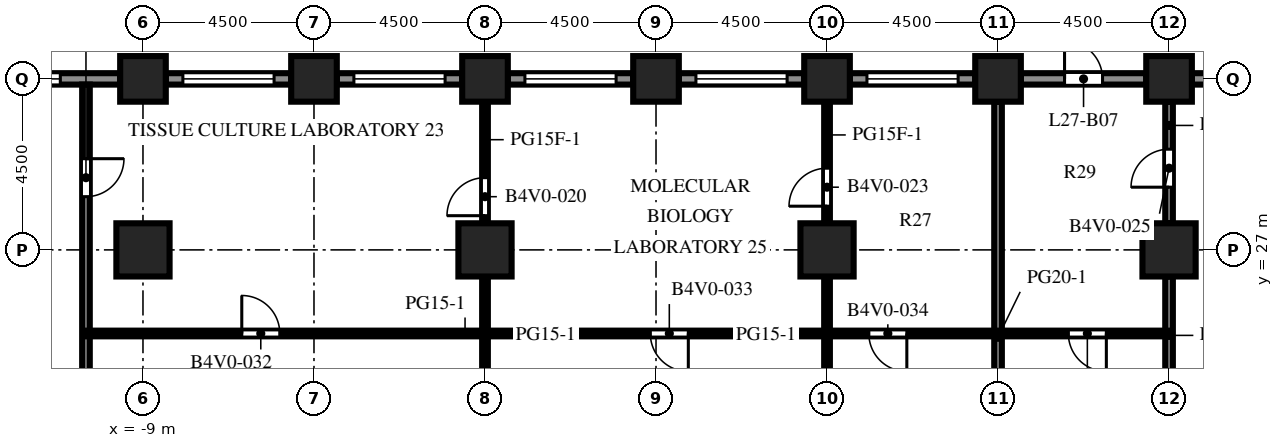
"""IFC4 building model, lengths in metres.
Left out: names, types, materials, properties, quantities, classifications, styles, units other than length and angle.
Written with IfcOpenShell. Run it as: python <this file> out.ifc"""

import sys

from ifc_helpers import new_model, si_unit, direction, frame, frame_2d, origin, origin_2d, place, context, subcontext, project, spatial, rectangle, extrude, element, fill, save


model = new_model("IFC4")
c1 = context("Model", 3, precision=1e-05, world=origin(), true_north=direction((0.0, 1.0)))
c2 = subcontext(c1, "Body", "Model", "MODEL_VIEW")
j1 = project(units=[si_unit("LENGTHUNIT", "METRE"), si_unit("PLANEANGLEUNIT", "RADIAN")], contexts=[c1])
p1 = place(None, origin())
s1 = spatial("IfcSite", under=j1, at=p1, CompositionType="ELEMENT")
p2 = place(p1, origin())
s2 = spatial("IfcBuilding", under=s1, at=p2, CompositionType="ELEMENT")
p3 = place(p2, frame((0.0, 0.0, 120.8)))
s3 = spatial("IfcBuildingStorey", under=s2, at=p3, CompositionType="ELEMENT", Elevation=120.8)
for number, where, z_axis, x_axis in (
    (1, (-9.0, 31.5, 0.0), (0.0, 0.0, 1.0), (1.0, 0.0, 0.0)),
    (2, (-4.5, 31.5, 0.0), (0.0, 0.0, 1.0), (1.0, 0.0, 0.0)),
    (3, (0.0, 31.5, 0.0), (0.0, 0.0, 1.0), (1.0, 0.0, 0.0)),
    (4, (4.5, 31.5, 0.0), (0.0, 0.0, 1.0), (1.0, 0.0, 0.0)),
    (5, (9.0, 31.5, 0.0), (0.0, 0.0, 1.0), (1.0, 0.0, 0.0)),
    (6, (13.5, 31.5, 0.0), (0.0, 0.0, 1.0), (1.0, 0.0, 0.0)),
    (7, (18.0, 31.5, 0.0), (0.0, 0.0, 1.0), (1.0, 0.0, 0.0)),
):
    element("IfcColumn", number, at=place(p3, frame(where, z_axis=z_axis, x_axis=x_axis)), inside=s3, PredefinedType="COLUMN", context=c2, shape_type="SweptSolid", body=[
        extrude(rectangle(XDim=1.2, YDim=1.2, at=origin_2d()), origin(), (0.0, 0.0, 1.0), 4.1),
    ])
for number, where, z_axis, x_axis in (
    (8, (-9.0, 27.0, 0.0), (0.0, 0.0, 1.0), (1.0, 0.0, 0.0)),
    (9, (0.0, 27.0, 0.0), (0.0, 0.0, 1.0), (1.0, 0.0, 0.0)),
    (10, (9.0, 27.0, 0.0), (0.0, 0.0, 1.0), (1.0, 0.0, 0.0)),
    (11, (18.0, 27.0, 0.0), (0.0, 0.0, 1.0), (1.0, 0.0, 0.0)),
):
    element("IfcColumn", number, at=place(p3, frame(where, z_axis=z_axis, x_axis=x_axis)), inside=s3, PredefinedType="COLUMN", context=c2, shape_type="SweptSolid", body=[
        extrude(rectangle(XDim=1.4, YDim=1.4, at=origin_2d()), origin(), (0.0, 0.0, 1.0), 4.1),
    ])
p4 = place(p3, frame((18.6, 31.5, 0.0), z_axis=(0.0, 0.0, 1.0), x_axis=(1.0, 0.0, 0.0)))
e12 = element("IfcWall", 12, at=p4, inside=s3, PredefinedType="SOLIDWALL", context=c2, shape_type="SweptSolid", body=[
    extrude(rectangle(XDim=3.3, YDim=0.3, at=frame_2d((1.65, 0.0))), origin(), (0.0, 0.0, 1.0), 2.75),
])
p5 = place(p4, frame((0.525, 0.0, 0.8)))
e13 = element("IfcOpeningElement", 13, at=p5, cuts=e12, PredefinedType="OPENING", context=c2, shape_type="SweptSolid", body=[
    extrude(rectangle(XDim=1.2, YDim=1.7, at=frame_2d((0.6, 0.85))), frame((0.0, 0.16, 0.0), z_axis=(0.0, -1.0, 0.0), x_axis=(1.0, 0.0, 0.0)), (0.0, 0.0, 1.0), 0.32),
])
p6 = place(p3, frame((14.1, 31.5, 0.0), z_axis=(0.0, 0.0, 1.0), x_axis=(1.0, 0.0, 0.0)))
e14 = element("IfcWall", 14, at=p6, inside=s3, PredefinedType="SOLIDWALL", context=c2, shape_type="SweptSolid", body=[
    extrude(rectangle(XDim=3.3, YDim=0.3, at=frame_2d((1.65, 0.0))), origin(), (0.0, 0.0, 1.0), 2.75),
])
p7 = place(p6, frame((1.15, 0.0, 0.0)))
e15 = element("IfcOpeningElement", 15, at=p7, cuts=e14, PredefinedType="OPENING", context=c2, shape_type="SweptSolid", body=[
    extrude(rectangle(XDim=1.0, YDim=2.2, at=frame_2d((0.5, 1.1))), frame((0.0, 0.16, 0.0), z_axis=(0.0, -1.0, 0.0), x_axis=(1.0, 0.0, 0.0)), (0.0, 0.0, 1.0), 0.32),
])
p8 = place(p3, frame((9.6, 31.5, 0.0), z_axis=(0.0, 0.0, 1.0), x_axis=(1.0, 0.0, 0.0)))
e16 = element("IfcWall", 16, at=p8, inside=s3, PredefinedType="SOLIDWALL", context=c2, shape_type="SweptSolid", body=[
    extrude(rectangle(XDim=3.3, YDim=0.3, at=frame_2d((1.65, 0.0))), origin(), (0.0, 0.0, 1.0), 2.75),
])
p9 = place(p8, frame((0.45, 0.0, 0.8)))
e17 = element("IfcOpeningElement", 17, at=p9, cuts=e16, PredefinedType="OPENING", context=c2, shape_type="SweptSolid", body=[
    extrude(rectangle(XDim=2.4, YDim=1.7, at=frame_2d((1.2, 0.85))), frame((0.0, 0.16, 0.0), z_axis=(0.0, -1.0, 0.0), x_axis=(1.0, 0.0, 0.0)), (0.0, 0.0, 1.0), 0.32),
])
p10 = place(p3, frame((5.1, 31.5, 0.0), z_axis=(0.0, 0.0, 1.0), x_axis=(1.0, 0.0, 0.0)))
e18 = element("IfcWall", 18, at=p10, inside=s3, PredefinedType="SOLIDWALL", context=c2, shape_type="SweptSolid", body=[
    extrude(rectangle(XDim=3.3, YDim=0.3, at=frame_2d((1.65, 0.0))), origin(), (0.0, 0.0, 1.0), 2.75),
])
p11 = place(p10, frame((0.45, 0.0, 0.8)))
e19 = element("IfcOpeningElement", 19, at=p11, cuts=e18, PredefinedType="OPENING", context=c2, shape_type="SweptSolid", body=[
    extrude(rectangle(XDim=2.4, YDim=1.7, at=frame_2d((1.2, 0.85))), frame((0.0, 0.16, 0.0), z_axis=(0.0, -1.0, 0.0), x_axis=(1.0, 0.0, 0.0)), (0.0, 0.0, 1.0), 0.32),
])
p12 = place(p3, frame((0.6, 31.5, 0.0), z_axis=(0.0, 0.0, 1.0), x_axis=(1.0, 0.0, 0.0)))
e20 = element("IfcWall", 20, at=p12, inside=s3, PredefinedType="SOLIDWALL", context=c2, shape_type="SweptSolid", body=[
    extrude(rectangle(XDim=3.3, YDim=0.3, at=frame_2d((1.65, 0.0))), origin(), (0.0, 0.0, 1.0), 2.75),
])
p13 = place(p12, frame((0.45, 0.0, 0.8)))
e21 = element("IfcOpeningElement", 21, at=p13, cuts=e20, PredefinedType="OPENING", context=c2, shape_type="SweptSolid", body=[
    extrude(rectangle(XDim=2.4, YDim=1.7, at=frame_2d((1.2, 0.85))), frame((0.0, 0.16, 0.0), z_axis=(0.0, -1.0, 0.0), x_axis=(1.0, 0.0, 0.0)), (0.0, 0.0, 1.0), 0.32),
])
p14 = place(p3, frame((-3.9, 31.5, 0.0), z_axis=(0.0, 0.0, 1.0), x_axis=(1.0, 0.0, 0.0)))
e22 = element("IfcWall", 22, at=p14, inside=s3, PredefinedType="SOLIDWALL", context=c2, shape_type="SweptSolid", body=[
    extrude(rectangle(XDim=3.3, YDim=0.3, at=frame_2d((1.65, 0.0))), origin(), (0.0, 0.0, 1.0), 2.75),
])
p15 = place(p14, frame((0.45, 0.0, 0.8)))
e23 = element("IfcOpeningElement", 23, at=p15, cuts=e22, PredefinedType="OPENING", context=c2, shape_type="SweptSolid", body=[
    extrude(rectangle(XDim=2.4, YDim=1.7, at=frame_2d((1.2, 0.85))), frame((0.0, 0.16, 0.0), z_axis=(0.0, -1.0, 0.0), x_axis=(1.0, 0.0, 0.0)), (0.0, 0.0, 1.0), 0.32),
])
p16 = place(p3, frame((-8.4, 31.5, 0.0), z_axis=(0.0, 0.0, 1.0), x_axis=(1.0, 0.0, 0.0)))
e24 = element("IfcWall", 24, at=p16, inside=s3, PredefinedType="SOLIDWALL", context=c2, shape_type="SweptSolid", body=[
    extrude(rectangle(XDim=3.3, YDim=0.3, at=frame_2d((1.65, 0.0))), origin(), (0.0, 0.0, 1.0), 2.75),
])
p17 = place(p16, frame((0.45, 0.0, 0.8)))
e25 = element("IfcOpeningElement", 25, at=p17, cuts=e24, PredefinedType="OPENING", context=c2, shape_type="SweptSolid", body=[
    extrude(rectangle(XDim=2.4, YDim=1.7, at=frame_2d((1.2, 0.85))), frame((0.0, 0.16, 0.0), z_axis=(0.0, -1.0, 0.0), x_axis=(1.0, 0.0, 0.0)), (0.0, 0.0, 1.0), 0.32),
])
p18 = place(p3, frame((-12.9, 31.5, 0.0), z_axis=(0.0, 0.0, 1.0), x_axis=(1.0, 0.0, 0.0)))
e26 = element("IfcWall", 26, at=p18, inside=s3, PredefinedType="SOLIDWALL", context=c2, shape_type="SweptSolid", body=[
    extrude(rectangle(XDim=3.3, YDim=0.3, at=frame_2d((1.65, 0.0))), origin(), (0.0, 0.0, 1.0), 2.75),
])
p19 = place(p18, frame((0.525, 0.0, 0.8)))
e27 = element("IfcOpeningElement", 27, at=p19, cuts=e26, PredefinedType="OPENING", context=c2, shape_type="SweptSolid", body=[
    extrude(rectangle(XDim=1.2, YDim=1.7, at=frame_2d((0.6, 0.85))), frame((0.0, 0.16, 0.0), z_axis=(0.0, -1.0, 0.0), x_axis=(1.0, 0.0, 0.0)), (0.0, 0.0, 1.0), 0.32),
])
p20 = place(p3, frame((-10.5, 31.35, 0.0), z_axis=(0.0, 0.0, 1.0), x_axis=(0.0, -1.0, 0.0)))
e28 = element("IfcWall", 28, at=p20, inside=s3, PredefinedType="PARTITIONING", context=c2, shape_type="SweptSolid", body=[
    extrude(rectangle(XDim=12.85, YDim=0.2, at=frame_2d((6.425, 0.0))), origin(), (0.0, 0.0, 1.0), 3.65),
])
p21 = place(p20, frame((1.95, 0.0, 0.0)))
e29 = element("IfcOpeningElement", 29, at=p21, cuts=e28, PredefinedType="OPENING", context=c2, shape_type="SweptSolid", body=[
    extrude(rectangle(XDim=1.0, YDim=2.1, at=frame_2d((0.5, 1.05))), frame((0.0, 0.11, 0.0), z_axis=(0.0, -1.0, 0.0), x_axis=(1.0, 0.0, 0.0)), (0.0, 0.0, 1.0), 0.22),
])
p22 = place(p3, frame((0.0, 23.2, 0.0), z_axis=(0.0, 0.0, 1.0), x_axis=(0.0, 1.0, 0.0)))
e30 = element("IfcWall", 30, at=p22, inside=s3, PredefinedType="PARTITIONING", context=c2, shape_type="SweptSolid", body=[
    extrude(rectangle(XDim=3.1, YDim=0.15, at=frame_2d((1.55, 0.0))), origin(), (0.0, 0.0, 1.0), 3.65),
])
p23 = place(p3, frame((0.0, 30.9, 0.0), z_axis=(0.0, 0.0, 1.0), x_axis=(0.0, -1.0, 0.0)))
e31 = element("IfcWall", 31, at=p23, inside=s3, PredefinedType="PARTITIONING", context=c2, shape_type="SweptSolid", body=[
    extrude(rectangle(XDim=3.2, YDim=0.15, at=frame_2d((1.6, 0.0))), origin(), (0.0, 0.0, 1.0), 3.65),
])
p24 = place(p23, frame((2.0, 0.0, 0.0)))
e32 = element("IfcOpeningElement", 32, at=p24, cuts=e31, PredefinedType="OPENING", context=c2, shape_type="SweptSolid", body=[
    extrude(rectangle(XDim=1.0, YDim=2.1, at=frame_2d((0.5, 1.05))), frame((0.0, 0.085, 0.0), z_axis=(0.0, -1.0, 0.0), x_axis=(1.0, 0.0, 0.0)), (0.0, 0.0, 1.0), 0.17),
])
p25 = place(p3, frame((9.0, 23.2, 0.0), z_axis=(0.0, 0.0, 1.0), x_axis=(0.0, 1.0, 0.0)))
e33 = element("IfcWall", 33, at=p25, inside=s3, PredefinedType="PARTITIONING", context=c2, shape_type="SweptSolid", body=[
    extrude(rectangle(XDim=3.1, YDim=0.15, at=frame_2d((1.55, 0.0))), origin(), (0.0, 0.0, 1.0), 3.65),
])
p26 = place(p3, frame((9.0, 30.9, 0.0), z_axis=(0.0, 0.0, 1.0), x_axis=(0.0, -1.0, 0.0)))
e34 = element("IfcWall", 34, at=p26, inside=s3, PredefinedType="PARTITIONING", context=c2, shape_type="SweptSolid", body=[
    extrude(rectangle(XDim=3.2, YDim=0.15, at=frame_2d((1.6, 0.0))), origin(), (0.0, 0.0, 1.0), 3.65),
])
p27 = place(p26, frame((1.75, 0.0, 0.0)))
e35 = element("IfcOpeningElement", 35, at=p27, cuts=e34, PredefinedType="OPENING", context=c2, shape_type="SweptSolid", body=[
    extrude(rectangle(XDim=1.0, YDim=2.1, at=frame_2d((0.5, 1.05))), frame((0.0, 0.085, 0.0), z_axis=(0.0, -1.0, 0.0), x_axis=(1.0, 0.0, 0.0)), (0.0, 0.0, 1.0), 0.17),
])
p28 = place(p3, frame((13.5, 18.5, 0.0), z_axis=(0.0, 0.0, 1.0), x_axis=(0.0, 1.0, 0.0)))
e36 = element("IfcWall", 36, at=p28, inside=s3, PredefinedType="PARTITIONING", context=c2, shape_type="SweptSolid", body=[
    extrude(rectangle(XDim=12.4, YDim=0.2, at=frame_2d((6.2, 0.0))), origin(), (0.0, 0.0, 1.0), 3.65),
])
p29 = place(p3, frame((18.0, 23.2, 0.0), z_axis=(0.0, 0.0, 1.0), x_axis=(0.0, 1.0, 0.0)))
e37 = element("IfcWall", 37, at=p29, inside=s3, PredefinedType="PARTITIONING", context=c2, shape_type="SweptSolid", body=[
    extrude(rectangle(XDim=3.1, YDim=0.2, at=frame_2d((1.55, 0.0))), origin(), (0.0, 0.0, 1.0), 3.65),
])
p30 = place(p3, frame((18.0, 27.7, 0.0), z_axis=(0.0, 0.0, 1.0), x_axis=(0.0, 1.0, 0.0)))
e38 = element("IfcWall", 38, at=p30, inside=s3, PredefinedType="PARTITIONING", context=c2, shape_type="SweptSolid", body=[
    extrude(rectangle(XDim=3.2, YDim=0.2, at=frame_2d((1.6, 0.0))), origin(), (0.0, 0.0, 1.0), 3.65),
])
p31 = place(p30, frame((0.95, 0.0, 0.0)))
e39 = element("IfcOpeningElement", 39, at=p31, cuts=e38, PredefinedType="OPENING", context=c2, shape_type="SweptSolid", body=[
    extrude(rectangle(XDim=1.0, YDim=2.1, at=frame_2d((0.5, 1.05))), frame((0.0, 0.11, 0.0), z_axis=(0.0, -1.0, 0.0), x_axis=(1.0, 0.0, 0.0)), (0.0, 0.0, 1.0), 0.22),
])
p32 = place(p3, frame((18.0, 24.8, 0.0), z_axis=(0.0, 0.0, 1.0), x_axis=(-1.0, 0.0, 0.0)))
e40 = element("IfcWall", 40, at=p32, inside=s3, PredefinedType="PARTITIONING", context=c2, shape_type="SweptSolid", body=[
    extrude(rectangle(XDim=28.5, YDim=0.15, at=frame_2d((14.25, 0.0))), origin(), (0.0, 0.0, 1.0), 3.65),
])
p33 = place(p32, frame((23.4, 0.0, 0.0)))
e41 = element("IfcOpeningElement", 41, at=p33, cuts=e40, PredefinedType="OPENING", context=c2, shape_type="SweptSolid", body=[
    extrude(rectangle(XDim=1.0, YDim=2.1, at=frame_2d((0.5, 1.05))), frame((0.0, 0.085, 0.0), z_axis=(0.0, -1.0, 0.0), x_axis=(1.0, 0.0, 0.0)), (0.0, 0.0, 1.0), 0.17),
])
p34 = place(p32, frame((12.65, 0.0, 0.0)))
e42 = element("IfcOpeningElement", 42, at=p34, cuts=e40, PredefinedType="OPENING", context=c2, shape_type="SweptSolid", body=[
    extrude(rectangle(XDim=1.0, YDim=2.1, at=frame_2d((0.5, 1.05))), frame((0.0, 0.085, 0.0), z_axis=(0.0, -1.0, 0.0), x_axis=(1.0, 0.0, 0.0)), (0.0, 0.0, 1.0), 0.17),
])
p35 = place(p32, frame((6.9, 0.0, 0.0)))
e43 = element("IfcOpeningElement", 43, at=p35, cuts=e40, PredefinedType="OPENING", context=c2, shape_type="SweptSolid", body=[
    extrude(rectangle(XDim=1.0, YDim=2.1, at=frame_2d((0.5, 1.05))), frame((0.0, 0.085, 0.0), z_axis=(0.0, -1.0, 0.0), x_axis=(1.0, 0.0, 0.0)), (0.0, 0.0, 1.0), 0.17),
])
p36 = place(p32, frame((1.65, 0.0, 0.0)))
e44 = element("IfcOpeningElement", 44, at=p36, cuts=e40, PredefinedType="OPENING", context=c2, shape_type="SweptSolid", body=[
    extrude(rectangle(XDim=1.0, YDim=2.1, at=frame_2d((0.5, 1.05))), frame((0.0, 0.085, 0.0), z_axis=(0.0, -1.0, 0.0), x_axis=(1.0, 0.0, 0.0)), (0.0, 0.0, 1.0), 0.17),
])
p37 = place(p7, origin())
e45 = element("IfcDoor", 45, at=p37, inside=s3, OperationType="SINGLE_SWING_LEFT", PredefinedType="DOOR", context=c2, shape_type="SweptSolid", body=[
    extrude(rectangle(XDim=1.0, YDim=2.2, at=frame_2d((0.5, 1.1))), frame((0.0, 0.025, 0.0), z_axis=(0.0, -1.0, 0.0), x_axis=(1.0, 0.0, 0.0)), (0.0, 0.0, 1.0), 0.05),
])
fill(e15, e45)
p38 = place(p9, origin())
e46 = element("IfcWindow", 46, at=p38, inside=s3, PartitioningType="SINGLE_PANEL", PredefinedType="WINDOW", context=c2, shape_type="SweptSolid", body=[
    extrude(rectangle(XDim=2.4, YDim=1.7, at=frame_2d((1.2, 0.85))), frame((0.0, 0.03, 0.0), z_axis=(0.0, -1.0, 0.0), x_axis=(1.0, 0.0, 0.0)), (0.0, 0.0, 1.0), 0.06),
])
fill(e17, e46)
p39 = place(p11, origin())
e47 = element("IfcWindow", 47, at=p39, inside=s3, PartitioningType="SINGLE_PANEL", PredefinedType="WINDOW", context=c2, shape_type="SweptSolid", body=[
    extrude(rectangle(XDim=2.4, YDim=1.7, at=frame_2d((1.2, 0.85))), frame((0.0, 0.03, 0.0), z_axis=(0.0, -1.0, 0.0), x_axis=(1.0, 0.0, 0.0)), (0.0, 0.0, 1.0), 0.06),
])
fill(e19, e47)
p40 = place(p13, origin())
e48 = element("IfcWindow", 48, at=p40, inside=s3, PartitioningType="SINGLE_PANEL", PredefinedType="WINDOW", context=c2, shape_type="SweptSolid", body=[
    extrude(rectangle(XDim=2.4, YDim=1.7, at=frame_2d((1.2, 0.85))), frame((0.0, 0.03, 0.0), z_axis=(0.0, -1.0, 0.0), x_axis=(1.0, 0.0, 0.0)), (0.0, 0.0, 1.0), 0.06),
])
fill(e21, e48)
p41 = place(p15, origin())
e49 = element("IfcWindow", 49, at=p41, inside=s3, PartitioningType="SINGLE_PANEL", PredefinedType="WINDOW", context=c2, shape_type="SweptSolid", body=[
    extrude(rectangle(XDim=2.4, YDim=1.7, at=frame_2d((1.2, 0.85))), frame((0.0, 0.03, 0.0), z_axis=(0.0, -1.0, 0.0), x_axis=(1.0, 0.0, 0.0)), (0.0, 0.0, 1.0), 0.06),
])
fill(e23, e49)
p42 = place(p17, origin())
e50 = element("IfcWindow", 50, at=p42, inside=s3, PartitioningType="SINGLE_PANEL", PredefinedType="WINDOW", context=c2, shape_type="SweptSolid", body=[
    extrude(rectangle(XDim=2.4, YDim=1.7, at=frame_2d((1.2, 0.85))), frame((0.0, 0.03, 0.0), z_axis=(0.0, -1.0, 0.0), x_axis=(1.0, 0.0, 0.0)), (0.0, 0.0, 1.0), 0.06),
])
fill(e25, e50)
p43 = place(p19, origin())
e51 = element("IfcWindow", 51, at=p43, inside=s3, PartitioningType="SINGLE_PANEL", PredefinedType="WINDOW", context=c2, shape_type="SweptSolid", body=[
    extrude(rectangle(XDim=1.2, YDim=1.7, at=frame_2d((0.6, 0.85))), frame((0.0, 0.03, 0.0), z_axis=(0.0, -1.0, 0.0), x_axis=(1.0, 0.0, 0.0)), (0.0, 0.0, 1.0), 0.06),
])
fill(e27, e51)
p44 = place(p21, origin())
e52 = element("IfcDoor", 52, at=p44, inside=s3, OperationType="SINGLE_SWING_LEFT", PredefinedType="DOOR", context=c2, shape_type="SweptSolid", body=[
    extrude(rectangle(XDim=1.0, YDim=2.1, at=frame_2d((0.5, 1.05))), frame((0.0, 0.025, 0.0), z_axis=(0.0, -1.0, 0.0), x_axis=(1.0, 0.0, 0.0)), (0.0, 0.0, 1.0), 0.05),
])
fill(e29, e52)
p45 = place(p24, origin())
e53 = element("IfcDoor", 53, at=p45, inside=s3, OperationType="SINGLE_SWING_RIGHT", PredefinedType="DOOR", context=c2, shape_type="SweptSolid", body=[
    extrude(rectangle(XDim=1.0, YDim=2.1, at=frame_2d((0.5, 1.05))), frame((0.0, 0.025, 0.0), z_axis=(0.0, -1.0, 0.0), x_axis=(1.0, 0.0, 0.0)), (0.0, 0.0, 1.0), 0.05),
])
fill(e32, e53)
p46 = place(p27, origin())
e54 = element("IfcDoor", 54, at=p46, inside=s3, OperationType="SINGLE_SWING_RIGHT", PredefinedType="DOOR", context=c2, shape_type="SweptSolid", body=[
    extrude(rectangle(XDim=1.0, YDim=2.1, at=frame_2d((0.5, 1.05))), frame((0.0, 0.025, 0.0), z_axis=(0.0, -1.0, 0.0), x_axis=(1.0, 0.0, 0.0)), (0.0, 0.0, 1.0), 0.05),
])
fill(e35, e54)
p47 = place(p31, origin())
e55 = element("IfcDoor", 55, at=p47, inside=s3, OperationType="SINGLE_SWING_LEFT", PredefinedType="DOOR", context=c2, shape_type="SweptSolid", body=[
    extrude(rectangle(XDim=1.0, YDim=2.1, at=frame_2d((0.5, 1.05))), frame((0.0, 0.025, 0.0), z_axis=(0.0, -1.0, 0.0), x_axis=(1.0, 0.0, 0.0)), (0.0, 0.0, 1.0), 0.05),
])
fill(e39, e55)
p48 = place(p33, origin())
e56 = element("IfcDoor", 56, at=p48, inside=s3, OperationType="SINGLE_SWING_RIGHT", PredefinedType="DOOR", context=c2, shape_type="SweptSolid", body=[
    extrude(rectangle(XDim=1.0, YDim=2.1, at=frame_2d((0.5, 1.05))), frame((0.0, 0.025, 0.0), z_axis=(0.0, -1.0, 0.0), x_axis=(1.0, 0.0, 0.0)), (0.0, 0.0, 1.0), 0.05),
])
fill(e41, e56)
p49 = place(p34, origin())
e57 = element("IfcDoor", 57, at=p49, inside=s3, OperationType="SINGLE_SWING_LEFT", PredefinedType="DOOR", context=c2, shape_type="SweptSolid", body=[
    extrude(rectangle(XDim=1.0, YDim=2.1, at=frame_2d((0.5, 1.05))), frame((0.0, 0.025, 0.0), z_axis=(0.0, -1.0, 0.0), x_axis=(1.0, 0.0, 0.0)), (0.0, 0.0, 1.0), 0.05),
])
fill(e42, e57)
p50 = place(p35, origin())
e58 = element("IfcDoor", 58, at=p50, inside=s3, OperationType="SINGLE_SWING_LEFT", PredefinedType="DOOR", context=c2, shape_type="SweptSolid", body=[
    extrude(rectangle(XDim=1.0, YDim=2.1, at=frame_2d((0.5, 1.05))), frame((0.0, 0.025, 0.0), z_axis=(0.0, -1.0, 0.0), x_axis=(1.0, 0.0, 0.0)), (0.0, 0.0, 1.0), 0.05),
])
fill(e43, e58)
p51 = place(p36, origin())
e59 = element("IfcDoor", 59, at=p51, inside=s3, OperationType="SINGLE_SWING_LEFT", PredefinedType="DOOR", context=c2, shape_type="SweptSolid", body=[
    extrude(rectangle(XDim=1.0, YDim=2.1, at=frame_2d((0.5, 1.05))), frame((0.0, 0.025, 0.0), z_axis=(0.0, -1.0, 0.0), x_axis=(1.0, 0.0, 0.0)), (0.0, 0.0, 1.0), 0.05),
])
fill(e44, e59)
save(model, sys.argv[1])
